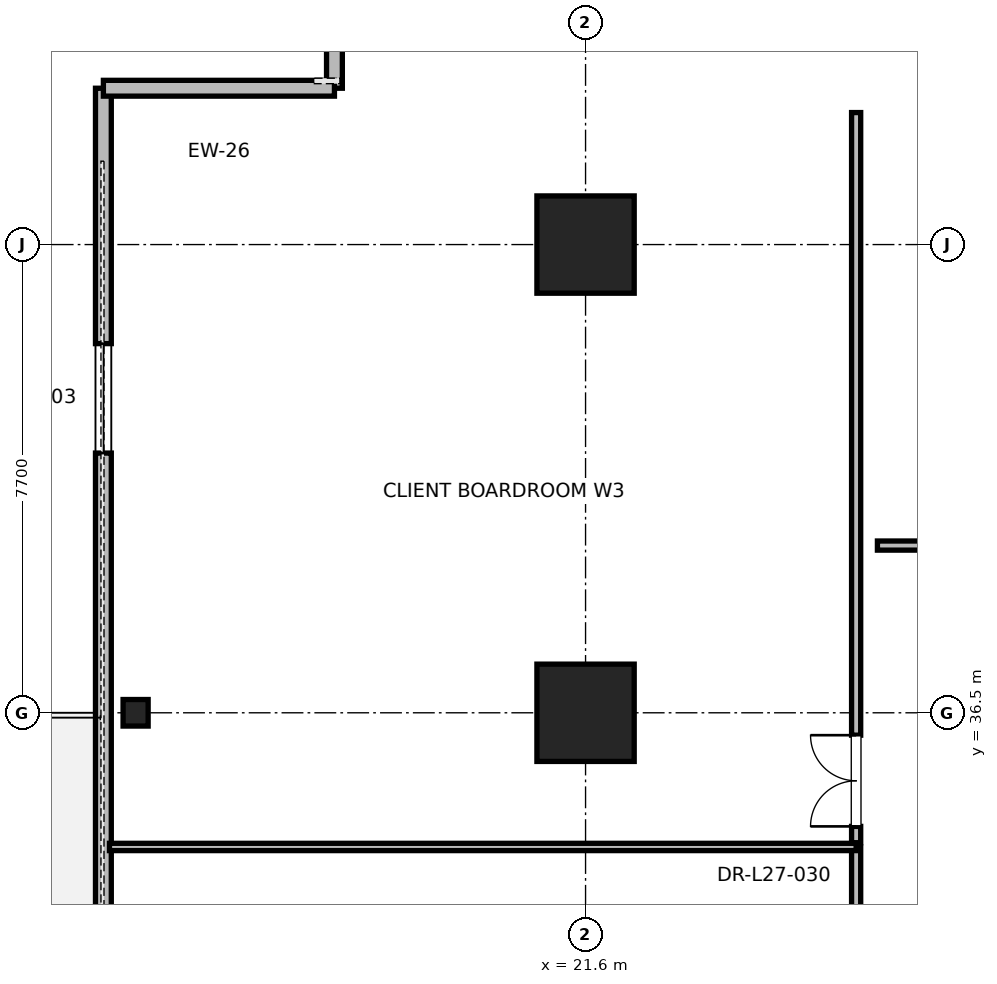
"""IFC4 building model, lengths in metres.
Left out: names, types, materials, properties, quantities, classifications, styles, units other than length and angle.
Written with IfcOpenShell. Run it as: python <this file> out.ifc"""

import sys

from ifc_helpers import new_model, si_unit, direction, frame, frame_2d, origin, origin_2d, place, context, subcontext, project, spatial, rectangle, i_section, extrude, element, fill, save


model = new_model("IFC4")
c1 = context("Model", 3, precision=1e-05, world=origin(), true_north=direction((0.0, 1.0)))
c2 = subcontext(c1, "Body", "Model", "MODEL_VIEW")
j1 = project(units=[si_unit("LENGTHUNIT", "METRE"), si_unit("PLANEANGLEUNIT", "RADIAN")], contexts=[c1])
p1 = place(None, origin())
s1 = spatial("IfcSite", under=j1, at=p1, CompositionType="ELEMENT")
p2 = place(p1, origin())
s2 = spatial("IfcBuilding", under=s1, at=p2, CompositionType="ELEMENT")
p3 = place(p2, frame((0.0, 0.0, 118.4)))
s3 = spatial("IfcBuildingStorey", under=s2, at=p3, CompositionType="ELEMENT", Elevation=118.4)
for number, where, z_axis, x_axis in (
    (1, (21.6, 36.5, 0.0), (0.0, 0.0, 1.0), (1.0, 0.0, 0.0)),
    (2, (21.6, 44.2, 0.0), (0.0, 0.0, 1.0), (1.0, 0.0, 0.0)),
):
    element("IfcColumn", number, at=place(p3, frame(where, z_axis=z_axis, x_axis=x_axis)), inside=s3, PredefinedType="COLUMN", context=c2, shape_type="SweptSolid", body=[
        extrude(rectangle(XDim=1.6, YDim=1.6, at=origin_2d()), origin(), (0.0, 0.0, 1.0), 5.0),
    ])
p4 = place(p3, frame((14.2, 36.5, 0.0), z_axis=(0.0, 0.0, 1.0), x_axis=(1.0, 0.0, 0.0)))
e3 = element("IfcColumn", 3, at=p4, inside=s3, PredefinedType="COLUMN", context=c2, shape_type="SweptSolid", body=[
    extrude(i_section(OverallWidth=0.412, OverallDepth=0.437, WebThickness=0.036, FlangeThickness=0.058, FilletRadius=0.015, at=origin_2d()), origin(), (0.0, 0.0, 1.0), 5.0),
])
p5 = place(p3, frame((13.67, 46.771, 0.0), z_axis=(0.0, 0.0, 1.0), x_axis=(0.0, -1.0, 0.0)))
e4 = element("IfcWall", 4, at=p5, inside=s3, PredefinedType="PARAPET", context=c2, shape_type="SweptSolid", body=[
    extrude(rectangle(XDim=38.542, YDim=0.26, at=frame_2d((19.271, 0.0))), origin(), (0.0, 0.0, 1.0), 3.91),
])
p6 = place(p5, frame((4.2, 0.0, 0.85)))
e5 = element("IfcOpeningElement", 5, at=p6, cuts=e4, PredefinedType="OPENING", context=c2, shape_type="SweptSolid", body=[
    extrude(rectangle(XDim=1.8, YDim=2.2, at=frame_2d((0.9, 1.1))), frame((0.0, 0.13, 0.0), z_axis=(0.0, -1.0, 0.0), x_axis=(1.0, 0.0, 0.0)), (0.0, 0.0, 1.0), 0.26),
])
p7 = place(p5, frame((18.671, 0.0, 0.0)))
e6 = element("IfcOpeningElement", 6, at=p7, cuts=e4, PredefinedType="OPENING", context=c2, shape_type="SweptSolid", body=[
    extrude(rectangle(XDim=1.2, YDim=2.2, at=frame_2d((0.6, 1.1))), frame((0.0, 0.13, 0.0), z_axis=(0.0, -1.0, 0.0), x_axis=(1.0, 0.0, 0.0)), (0.0, 0.0, 1.0), 0.26),
])
p8 = place(p5, frame((32.542, 0.0, 0.85)))
e7 = element("IfcOpeningElement", 7, at=p8, cuts=e4, PredefinedType="OPENING", context=c2, shape_type="SweptSolid", body=[
    extrude(rectangle(XDim=1.8, YDim=2.2, at=frame_2d((0.9, 1.1))), frame((0.0, 0.13, 0.0), z_axis=(0.0, -1.0, 0.0), x_axis=(1.0, 0.0, 0.0)), (0.0, 0.0, 1.0), 0.26),
])
p9 = place(p3, frame((17.47, 50.171, 0.0), z_axis=(0.0, 0.0, 1.0), x_axis=(0.0, -1.0, 0.0)))
e8 = element("IfcWall", 8, at=p9, inside=s3, PredefinedType="PARAPET", context=c2, shape_type="SweptSolid", body=[
    extrude(rectangle(XDim=3.4, YDim=0.26, at=frame_2d((1.7, 0.0))), origin(), (0.0, 0.0, 1.0), 4.7),
])
p10 = place(p9, frame((1.0, 0.0, 0.85)))
e9 = element("IfcOpeningElement", 9, at=p10, cuts=e8, PredefinedType="OPENING", context=c2, shape_type="SweptSolid", body=[
    extrude(rectangle(XDim=1.4, YDim=2.0, at=frame_2d((0.7, 1.0))), frame((0.0, 0.13, 0.0), z_axis=(0.0, -1.0, 0.0), x_axis=(1.0, 0.0, 0.0)), (0.0, 0.0, 1.0), 0.26),
])
p11 = place(p3, frame((17.47, 46.771, 0.0), z_axis=(0.0, 0.0, 1.0), x_axis=(-1.0, 0.0, 0.0)))
e10 = element("IfcWall", 10, at=p11, inside=s3, PredefinedType="PARAPET", context=c2, shape_type="SweptSolid", body=[
    extrude(rectangle(XDim=3.8, YDim=0.26, at=frame_2d((1.9, 0.0))), origin(), (0.0, 0.0, 1.0), 4.7),
])
p12 = place(p3, frame((26.4, 39.25, 0.0), z_axis=(0.0, 0.0, 1.0), x_axis=(1.0, 0.0, 0.0)))
e11 = element("IfcWall", 11, at=p12, inside=s3, PredefinedType="PARTITIONING", context=c2, shape_type="SweptSolid", body=[
    extrude(rectangle(XDim=8.976, YDim=0.15, at=frame_2d((4.488, 0.0))), origin(), (0.0, 0.0, 1.0), 2.85),
])
p13 = place(p12, frame((3.753, 0.0, 0.0)))
e12 = element("IfcOpeningElement", 12, at=p13, cuts=e11, PredefinedType="OPENING", context=c2, shape_type="SweptSolid", body=[
    extrude(rectangle(XDim=1.5, YDim=2.25, at=frame_2d((0.75, 1.125))), frame((0.0, 0.075, 0.0), z_axis=(0.0, -1.0, 0.0), x_axis=(1.0, 0.0, 0.0)), (0.0, 0.0, 1.0), 0.15),
])
p14 = place(p3, frame((26.05, 21.531, 0.0), z_axis=(0.0, 0.0, 1.0), x_axis=(0.0, 1.0, 0.0)))
e13 = element("IfcWall", 13, at=p14, inside=s3, PredefinedType="PARTITIONING", context=c2, shape_type="SweptSolid", body=[
    extrude(rectangle(XDim=12.762, YDim=0.15, at=frame_2d((6.381, 0.0))), origin(), (0.0, 0.0, 1.0), 2.85),
])
p15 = place(p14, frame((5.821, 0.0, 0.0)))
e14 = element("IfcOpeningElement", 14, at=p15, cuts=e13, PredefinedType="OPENING", context=c2, shape_type="SweptSolid", body=[
    extrude(rectangle(XDim=1.05, YDim=2.2, at=frame_2d((0.525, 1.1))), frame((0.0, 0.075, 0.0), z_axis=(0.0, -1.0, 0.0), x_axis=(1.0, 0.0, 0.0)), (0.0, 0.0, 1.0), 0.15),
])
p16 = place(p3, frame((13.77, 34.293, 0.0), z_axis=(0.0, 0.0, 1.0), x_axis=(1.0, 0.0, 0.0)))
e15 = element("IfcWall", 15, at=p16, inside=s3, PredefinedType="PARTITIONING", context=c2, shape_type="SweptSolid", body=[
    extrude(rectangle(XDim=12.28, YDim=0.12, at=frame_2d((6.14, 0.0))), origin(), (0.0, 0.0, 1.0), 2.85),
])
p17 = place(p3, frame((26.05, 34.364, 0.0), z_axis=(0.0, 0.0, 1.0), x_axis=(0.0, 1.0, 0.0)))
e16 = element("IfcWall", 16, at=p17, inside=s3, PredefinedType="PARTITIONING", context=c2, shape_type="SweptSolid", body=[
    extrude(rectangle(XDim=12.007, YDim=0.15, at=frame_2d((6.004, 0.0))), origin(), (0.0, 0.0, 1.0), 2.85),
])
p18 = place(p17, frame((0.268, 0.0, 0.0)))
e17 = element("IfcOpeningElement", 17, at=p18, cuts=e16, PredefinedType="OPENING", context=c2, shape_type="SweptSolid", body=[
    extrude(rectangle(XDim=1.5, YDim=2.25, at=frame_2d((0.75, 1.125))), frame((0.0, 0.075, 0.0), z_axis=(0.0, -1.0, 0.0), x_axis=(1.0, 0.0, 0.0)), (0.0, 0.0, 1.0), 0.15),
])
p19 = place(p6, origin())
e18 = element("IfcWindow", 18, at=p19, inside=s3, PartitioningType="SINGLE_PANEL", PredefinedType="WINDOW", context=c2, shape_type="SweptSolid", body=[
    extrude(rectangle(XDim=1.8, YDim=2.2, at=frame_2d((0.9, 1.1))), frame((0.0, 0.03, 0.0), z_axis=(0.0, -1.0, 0.0), x_axis=(1.0, 0.0, 0.0)), (0.0, 0.0, 1.0), 0.06),
])
fill(e5, e18)
p20 = place(p18, origin())
e19 = element("IfcDoor", 19, at=p20, inside=s3, OperationType="DOUBLE_DOOR_SINGLE_SWING", PredefinedType="DOOR", context=c2, shape_type="SweptSolid", body=[
    extrude(rectangle(XDim=1.5, YDim=2.25, at=frame_2d((0.75, 1.125))), frame((0.0, 0.025, 0.0), z_axis=(0.0, -1.0, 0.0), x_axis=(1.0, 0.0, 0.0)), (0.0, 0.0, 1.0), 0.05),
])
fill(e17, e19)
save(model, sys.argv[1])
